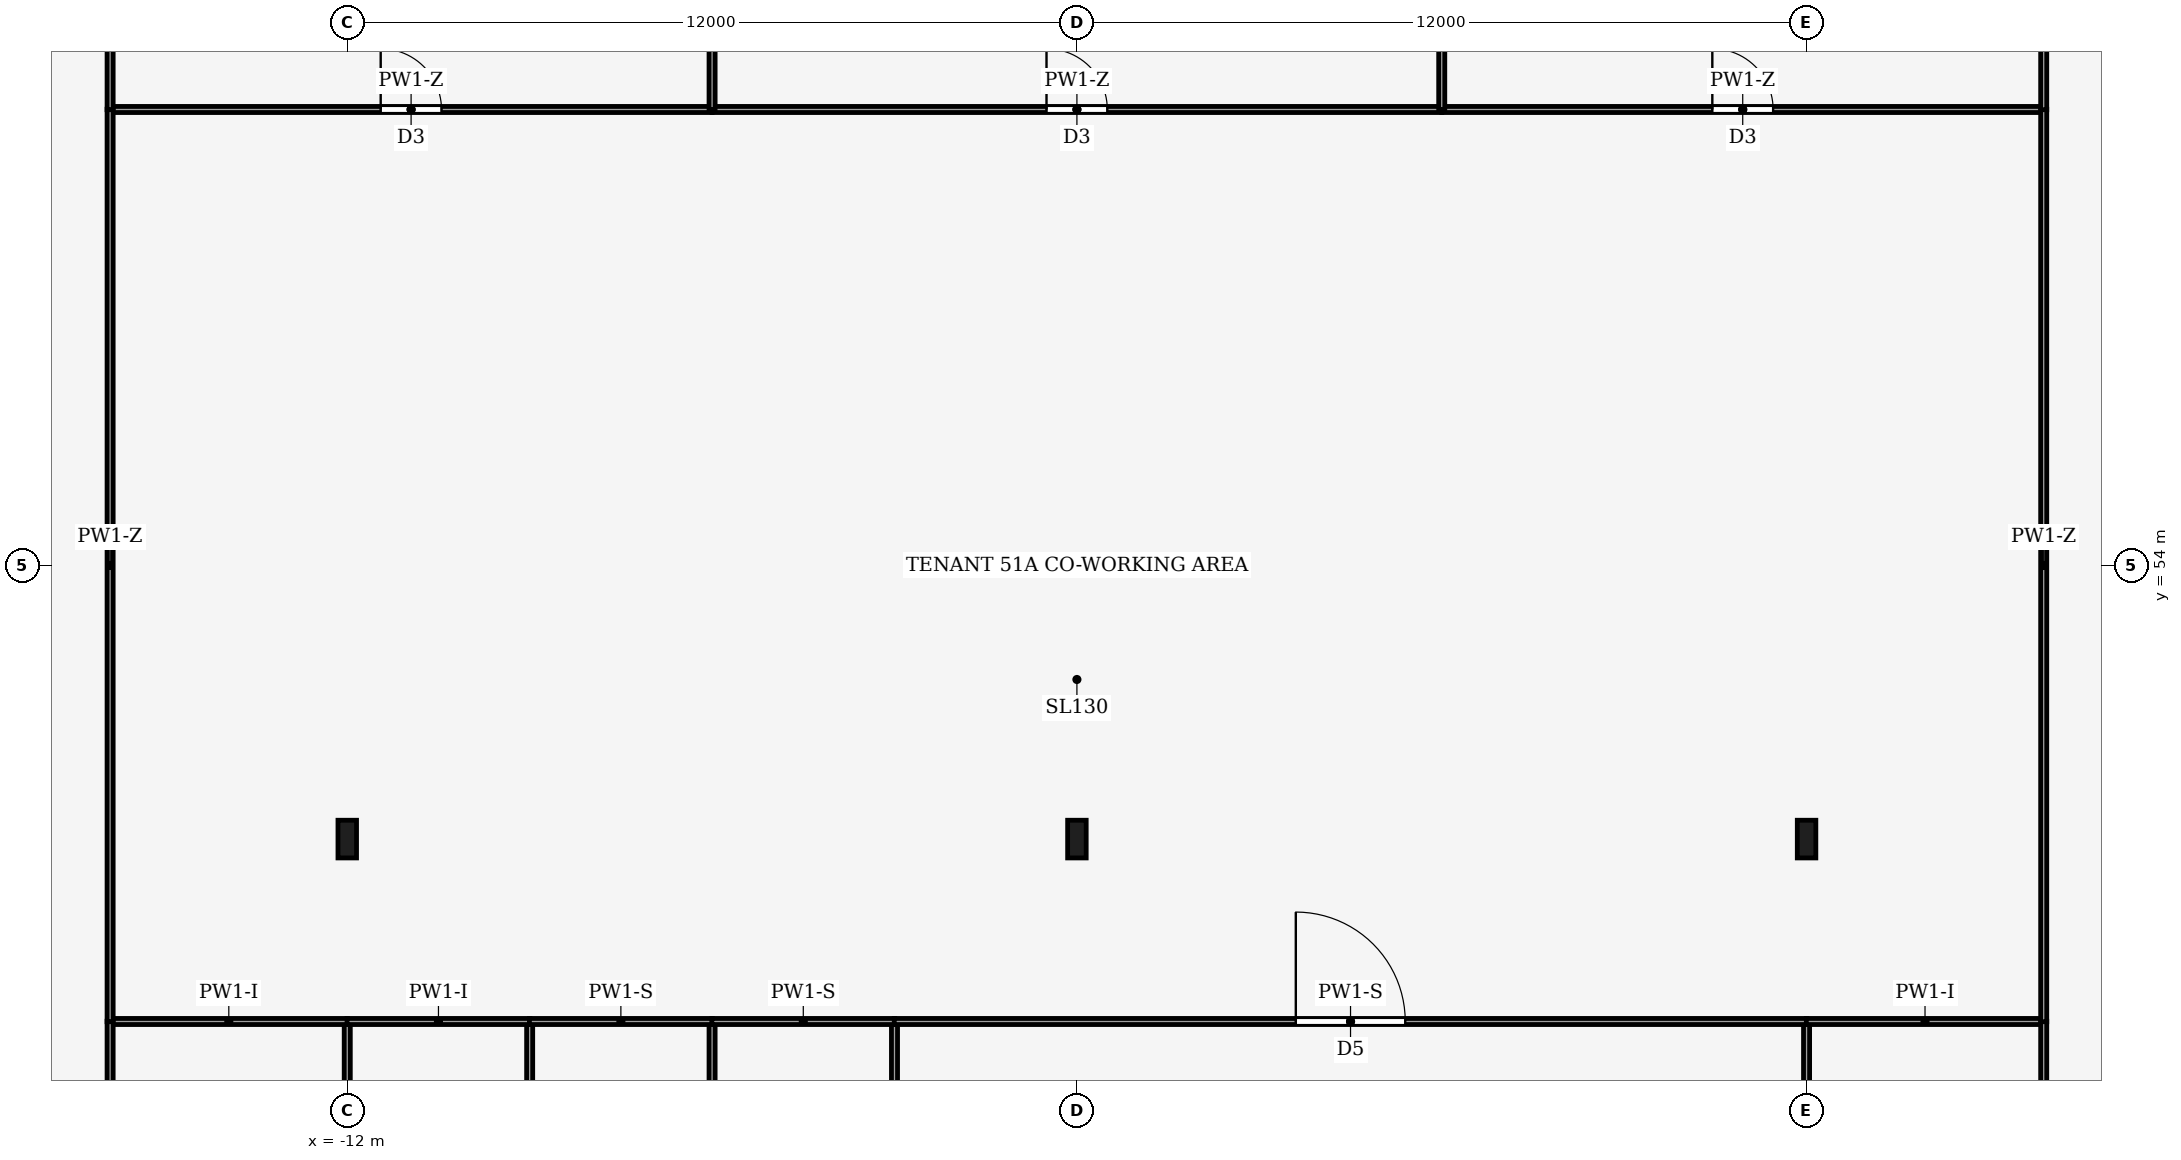
"""IFC4 building model, lengths in metres.
Left out: names, types, materials, properties, quantities, classifications, styles, units other than length and angle.
Written with IfcOpenShell. Run it as: python <this file> out.ifc"""

import sys

from ifc_helpers import new_model, si_unit, direction, frame, frame_2d, origin, origin_2d, place, context, subcontext, project, spatial, rectangle, i_section, extrude, element, fill, save


model = new_model("IFC4")
c1 = context("Model", 3, precision=1e-05, world=origin(), true_north=direction((0.0, 1.0)))
c2 = subcontext(c1, "Body", "Model", "MODEL_VIEW")
j1 = project(units=[si_unit("LENGTHUNIT", "METRE"), si_unit("PLANEANGLEUNIT", "RADIAN")], contexts=[c1])
p1 = place(None, origin())
s1 = spatial("IfcSite", under=j1, at=p1, CompositionType="ELEMENT")
p2 = place(p1, origin())
s2 = spatial("IfcBuilding", under=s1, at=p2, CompositionType="ELEMENT")
p3 = place(p2, frame((0.0, 0.0, 222.0)))
s3 = spatial("IfcBuildingStorey", under=s2, at=p3, CompositionType="ELEMENT", Elevation=222.0)
for number, where, z_axis, x_axis in (
    (1, (-12.0, 49.5, 0.0), (0.0, 0.0, 1.0), (1.0, 0.0, 0.0)),
    (2, (0.0, 49.5, 0.0), (0.0, 0.0, 1.0), (1.0, 0.0, 0.0)),
    (3, (12.0, 49.5, 0.0), (0.0, 0.0, 1.0), (1.0, 0.0, 0.0)),
):
    element("IfcColumn", number, at=place(p3, frame(where, z_axis=z_axis, x_axis=x_axis)), inside=s3, PredefinedType="COLUMN", context=c2, shape_type="SweptSolid", body=[
        extrude(i_section(OverallWidth=0.305, OverallDepth=0.62, WebThickness=0.021, FlangeThickness=0.04, FilletRadius=0.027, at=origin_2d()), origin(), (0.0, 0.0, 1.0), 4.0),
    ])
p4 = place(p3, frame((-12.0, 46.5, 0.0), z_axis=(0.0, 0.0, 1.0), x_axis=(0.0, -1.0, 0.0)))
e4 = element("IfcWall", 4, at=p4, inside=s3, PredefinedType="PARTITIONING", context=c2, shape_type="SweptSolid", body=[
    extrude(rectangle(XDim=5.6, YDim=0.1, at=frame_2d((2.8, 0.0))), origin(), (0.0, 0.0, 1.0), 3.32),
])
p5 = place(p4, frame((2.3, 0.0, 0.0)))
e5 = element("IfcOpeningElement", 5, at=p5, cuts=e4, PredefinedType="OPENING", context=c2, shape_type="SweptSolid", body=[
    extrude(rectangle(XDim=1.0, YDim=2.1, at=frame_2d((0.5, 1.05))), frame((0.0, 0.06, 0.0), z_axis=(0.0, -1.0, 0.0), x_axis=(1.0, 0.0, 0.0)), (0.0, 0.0, 1.0), 0.12),
])
p6 = place(p3, frame((-11.996, 46.5, 0.0), z_axis=(0.0, 0.0, 1.0), x_axis=(-1.0, 0.0, 0.0)))
e6 = element("IfcWall", 6, at=p6, inside=s3, PredefinedType="PARTITIONING", context=c2, shape_type="SweptSolid", body=[
    extrude(rectangle(XDim=3.904, YDim=0.1, at=frame_2d((1.952, 0.0))), origin(), (0.0, 0.0, 1.0), 3.75),
])
p7 = place(p3, frame((-15.9, 46.504, 0.0), z_axis=(0.0, 0.0, 1.0), x_axis=(0.0, -1.0, 0.0)))
e7 = element("IfcWall", 7, at=p7, inside=s3, PredefinedType="PARTITIONING", context=c2, shape_type="SweptSolid", body=[
    extrude(rectangle(XDim=5.608, YDim=0.1, at=frame_2d((2.804, 0.0))), origin(), (0.0, 0.0, 1.0), 3.32),
])
p8 = place(p3, frame((-9.0, 46.5, 0.0), z_axis=(0.0, 0.0, 1.0), x_axis=(0.0, -1.0, 0.0)))
e8 = element("IfcWall", 8, at=p8, inside=s3, PredefinedType="PARTITIONING", context=c2, shape_type="SweptSolid", body=[
    extrude(rectangle(XDim=5.6, YDim=0.1, at=frame_2d((2.8, 0.0))), origin(), (0.0, 0.0, 1.0), 3.75),
])
p9 = place(p8, frame((2.3, 0.0, 0.0)))
e9 = element("IfcOpeningElement", 9, at=p9, cuts=e8, PredefinedType="OPENING", context=c2, shape_type="SweptSolid", body=[
    extrude(rectangle(XDim=1.0, YDim=2.1, at=frame_2d((0.5, 1.05))), frame((0.0, 0.06, 0.0), z_axis=(0.0, -1.0, 0.0), x_axis=(1.0, 0.0, 0.0)), (0.0, 0.0, 1.0), 0.12),
])
p10 = place(p3, frame((-8.996, 46.5, 0.0), z_axis=(0.0, 0.0, 1.0), x_axis=(-1.0, 0.0, 0.0)))
e10 = element("IfcWall", 10, at=p10, inside=s3, PredefinedType="PARTITIONING", context=c2, shape_type="SweptSolid", body=[
    extrude(rectangle(XDim=3.008, YDim=0.1, at=frame_2d((1.504, 0.0))), origin(), (0.0, 0.0, 1.0), 3.75),
])
p11 = place(p3, frame((-6.0, 40.9, 0.0), z_axis=(0.0, 0.0, 1.0), x_axis=(0.0, 1.0, 0.0)))
e11 = element("IfcWall", 11, at=p11, inside=s3, PredefinedType="PARTITIONING", context=c2, shape_type="SweptSolid", body=[
    extrude(rectangle(XDim=5.6, YDim=0.1, at=frame_2d((2.8, 0.0))), origin(), (0.0, 0.0, 1.0), 3.75),
])
p12 = place(p3, frame((-5.996, 46.5, 0.0), z_axis=(0.0, 0.0, 1.0), x_axis=(-1.0, 0.0, 0.0)))
e12 = element("IfcWall", 12, at=p12, inside=s3, PredefinedType="PARTITIONING", context=c2, shape_type="SweptSolid", body=[
    extrude(rectangle(XDim=3.008, YDim=0.1, at=frame_2d((1.504, 0.0))), origin(), (0.0, 0.0, 1.0), 3.32),
])
p13 = place(p3, frame((-3.0, 40.9, 0.0), z_axis=(0.0, 0.0, 1.0), x_axis=(0.0, 1.0, 0.0)))
e13 = element("IfcWall", 13, at=p13, inside=s3, PredefinedType="PARTITIONING", context=c2, shape_type="SweptSolid", body=[
    extrude(rectangle(XDim=5.6, YDim=0.1, at=frame_2d((2.8, 0.0))), origin(), (0.0, 0.0, 1.0), 3.75),
])
p14 = place(p13, frame((2.3, 0.0, 0.0)))
e14 = element("IfcOpeningElement", 14, at=p14, cuts=e13, PredefinedType="OPENING", context=c2, shape_type="SweptSolid", body=[
    extrude(rectangle(XDim=1.0, YDim=2.1, at=frame_2d((0.5, 1.05))), frame((0.0, 0.06, 0.0), z_axis=(0.0, -1.0, 0.0), x_axis=(1.0, 0.0, 0.0)), (0.0, 0.0, 1.0), 0.12),
])
p15 = place(p3, frame((-2.996, 46.5, 0.0), z_axis=(0.0, 0.0, 1.0), x_axis=(-1.0, 0.0, 0.0)))
e15 = element("IfcWall", 15, at=p15, inside=s3, PredefinedType="PARTITIONING", context=c2, shape_type="SweptSolid", body=[
    extrude(rectangle(XDim=3.008, YDim=0.1, at=frame_2d((1.504, 0.0))), origin(), (0.0, 0.0, 1.0), 3.32),
])
p16 = place(p3, frame((12.0, 40.9, 0.0), z_axis=(0.0, 0.0, 1.0), x_axis=(0.0, 1.0, 0.0)))
e16 = element("IfcWall", 16, at=p16, inside=s3, PredefinedType="PARTITIONING", context=c2, shape_type="SweptSolid", body=[
    extrude(rectangle(XDim=5.6, YDim=0.1, at=frame_2d((2.8, 0.0))), origin(), (0.0, 0.0, 1.0), 3.32),
])
p17 = place(p3, frame((-3.004, 46.5, 0.0), z_axis=(0.0, 0.0, 1.0), x_axis=(1.0, 0.0, 0.0)))
e17 = element("IfcWall", 17, at=p17, inside=s3, PredefinedType="PARTITIONING", context=c2, shape_type="SweptSolid", body=[
    extrude(rectangle(XDim=15.008, YDim=0.1, at=frame_2d((7.504, 0.0))), origin(), (0.0, 0.0, 1.0), 3.32),
])
p18 = place(p17, frame((6.604, 0.0, 0.0)))
e18 = element("IfcOpeningElement", 18, at=p18, cuts=e17, PredefinedType="OPENING", context=c2, shape_type="SweptSolid", body=[
    extrude(rectangle(XDim=1.8, YDim=2.1, at=frame_2d((0.9, 1.05))), frame((0.0, 0.06, 0.0), z_axis=(0.0, -1.0, 0.0), x_axis=(1.0, 0.0, 0.0)), (0.0, 0.0, 1.0), 0.12),
])
p19 = place(p3, frame((15.9, 46.5, 0.0), z_axis=(0.0, 0.0, 1.0), x_axis=(-1.0, 0.0, 0.0)))
e19 = element("IfcWall", 19, at=p19, inside=s3, PredefinedType="PARTITIONING", context=c2, shape_type="SweptSolid", body=[
    extrude(rectangle(XDim=3.904, YDim=0.1, at=frame_2d((1.952, 0.0))), origin(), (0.0, 0.0, 1.0), 3.75),
])
p20 = place(p3, frame((15.9, 40.896, 0.0), z_axis=(0.0, 0.0, 1.0), x_axis=(0.0, 1.0, 0.0)))
e20 = element("IfcWall", 20, at=p20, inside=s3, PredefinedType="PARTITIONING", context=c2, shape_type="SweptSolid", body=[
    extrude(rectangle(XDim=5.608, YDim=0.1, at=frame_2d((2.804, 0.0))), origin(), (0.0, 0.0, 1.0), 3.32),
])
p21 = place(p3, frame((-15.9, 61.5, 0.0), z_axis=(0.0, 0.0, 1.0), x_axis=(1.0, 0.0, 0.0)))
e21 = element("IfcWall", 21, at=p21, inside=s3, PredefinedType="PARTITIONING", context=c2, shape_type="SweptSolid", body=[
    extrude(rectangle(XDim=9.9, YDim=0.1, at=frame_2d((4.95, 0.0))), origin(), (0.0, 0.0, 1.0), 3.12),
])
p22 = place(p21, frame((4.45, 0.0, 0.0)))
e22 = element("IfcOpeningElement", 22, at=p22, cuts=e21, PredefinedType="OPENING", context=c2, shape_type="SweptSolid", body=[
    extrude(rectangle(XDim=1.0, YDim=2.1, at=frame_2d((0.5, 1.05))), frame((0.0, 0.06, 0.0), z_axis=(0.0, -1.0, 0.0), x_axis=(1.0, 0.0, 0.0)), (0.0, 0.0, 1.0), 0.12),
])
p23 = place(p3, frame((-6.0, 61.5, 0.0), z_axis=(0.0, 0.0, 1.0), x_axis=(1.0, 0.0, 0.0)))
e23 = element("IfcWall", 23, at=p23, inside=s3, PredefinedType="PARTITIONING", context=c2, shape_type="SweptSolid", body=[
    extrude(rectangle(XDim=12.0, YDim=0.1, at=frame_2d((6.0, 0.0))), origin(), (0.0, 0.0, 1.0), 3.12),
])
p24 = place(p23, frame((5.5, 0.0, 0.0)))
e24 = element("IfcOpeningElement", 24, at=p24, cuts=e23, PredefinedType="OPENING", context=c2, shape_type="SweptSolid", body=[
    extrude(rectangle(XDim=1.0, YDim=2.1, at=frame_2d((0.5, 1.05))), frame((0.0, 0.06, 0.0), z_axis=(0.0, -1.0, 0.0), x_axis=(1.0, 0.0, 0.0)), (0.0, 0.0, 1.0), 0.12),
])
p25 = place(p3, frame((6.0, 61.5, 0.0), z_axis=(0.0, 0.0, 1.0), x_axis=(1.0, 0.0, 0.0)))
e25 = element("IfcWall", 25, at=p25, inside=s3, PredefinedType="PARTITIONING", context=c2, shape_type="SweptSolid", body=[
    extrude(rectangle(XDim=9.9, YDim=0.1, at=frame_2d((4.95, 0.0))), origin(), (0.0, 0.0, 1.0), 3.12),
])
p26 = place(p25, frame((4.45, 0.0, 0.0)))
e26 = element("IfcOpeningElement", 26, at=p26, cuts=e25, PredefinedType="OPENING", context=c2, shape_type="SweptSolid", body=[
    extrude(rectangle(XDim=1.0, YDim=2.1, at=frame_2d((0.5, 1.05))), frame((0.0, 0.06, 0.0), z_axis=(0.0, -1.0, 0.0), x_axis=(1.0, 0.0, 0.0)), (0.0, 0.0, 1.0), 0.12),
])
for number, where, z_axis, x_axis in (
    (27, (-15.9, 61.504, 0.0), (0.0, 0.0, 1.0), (0.0, -1.0, 0.0)),
    (28, (15.9, 46.496, 0.0), (0.0, 0.0, 1.0), (0.0, 1.0, 0.0)),
):
    element("IfcWall", number, at=place(p3, frame(where, z_axis=z_axis, x_axis=x_axis)), inside=s3, PredefinedType="PARTITIONING", context=c2, shape_type="SweptSolid", body=[
        extrude(rectangle(XDim=15.008, YDim=0.1, at=frame_2d((7.504, 0.0))), origin(), (0.0, 0.0, 1.0), 3.12),
    ])
p27 = place(p3, frame((-6.0, 61.5, 0.0), z_axis=(0.0, 0.0, 1.0), x_axis=(0.0, 1.0, 0.0)))
e29 = element("IfcWall", 29, at=p27, inside=s3, PredefinedType="PARTITIONING", context=c2, shape_type="SweptSolid", body=[
    extrude(rectangle(XDim=6.58, YDim=0.1, at=frame_2d((3.29, 0.0))), origin(), (0.0, 0.0, 1.0), 2.92),
])
p28 = place(p3, frame((-15.9, 68.905, 0.0), z_axis=(0.0, 0.0, 1.0), x_axis=(0.0, -1.0, 0.0)))
e30 = element("IfcWall", 30, at=p28, inside=s3, PredefinedType="PARTITIONING", context=c2, shape_type="SweptSolid", body=[
    extrude(rectangle(XDim=7.409, YDim=0.1, at=frame_2d((3.705, 0.0))), origin(), (0.0, 0.0, 1.0), 2.92),
])
p29 = place(p3, frame((6.0, 61.5, 0.0), z_axis=(0.0, 0.0, 1.0), x_axis=(0.0, 1.0, 0.0)))
e31 = element("IfcWall", 31, at=p29, inside=s3, PredefinedType="PARTITIONING", context=c2, shape_type="SweptSolid", body=[
    extrude(rectangle(XDim=6.58, YDim=0.1, at=frame_2d((3.29, 0.0))), origin(), (0.0, 0.0, 1.0), 2.92),
])
p30 = place(p3, frame((15.9, 61.496, 0.0), z_axis=(0.0, 0.0, 1.0), x_axis=(0.0, 1.0, 0.0)))
e32 = element("IfcWall", 32, at=p30, inside=s3, PredefinedType="PARTITIONING", context=c2, shape_type="SweptSolid", body=[
    extrude(rectangle(XDim=7.409, YDim=0.1, at=frame_2d((3.705, 0.0))), origin(), (0.0, 0.0, 1.0), 2.92),
])
p31 = place(p18, origin())
e33 = element("IfcDoor", 33, at=p31, inside=s3, OperationType="DOUBLE_DOOR_SINGLE_SWING", PredefinedType="DOOR", context=c2, shape_type="SweptSolid", body=[
    extrude(rectangle(XDim=1.8, YDim=2.1, at=frame_2d((0.9, 1.05))), frame((0.0, 0.025, 0.0), z_axis=(0.0, -1.0, 0.0), x_axis=(1.0, 0.0, 0.0)), (0.0, 0.0, 1.0), 0.05),
])
fill(e18, e33)
p32 = place(p22, origin())
e34 = element("IfcDoor", 34, at=p32, inside=s3, OperationType="SINGLE_SWING_LEFT", PredefinedType="DOOR", context=c2, shape_type="SweptSolid", body=[
    extrude(rectangle(XDim=1.0, YDim=2.1, at=frame_2d((0.5, 1.05))), frame((0.0, 0.025, 0.0), z_axis=(0.0, -1.0, 0.0), x_axis=(1.0, 0.0, 0.0)), (0.0, 0.0, 1.0), 0.05),
])
fill(e22, e34)
p33 = place(p24, origin())
e35 = element("IfcDoor", 35, at=p33, inside=s3, OperationType="SINGLE_SWING_RIGHT", PredefinedType="DOOR", context=c2, shape_type="SweptSolid", body=[
    extrude(rectangle(XDim=1.0, YDim=2.1, at=frame_2d((0.5, 1.05))), frame((0.0, 0.025, 0.0), z_axis=(0.0, -1.0, 0.0), x_axis=(1.0, 0.0, 0.0)), (0.0, 0.0, 1.0), 0.05),
])
fill(e24, e35)
p34 = place(p26, origin())
e36 = element("IfcDoor", 36, at=p34, inside=s3, OperationType="SINGLE_SWING_LEFT", PredefinedType="DOOR", context=c2, shape_type="SweptSolid", body=[
    extrude(rectangle(XDim=1.0, YDim=2.1, at=frame_2d((0.5, 1.05))), frame((0.0, 0.025, 0.0), z_axis=(0.0, -1.0, 0.0), x_axis=(1.0, 0.0, 0.0)), (0.0, 0.0, 1.0), 0.05),
])
fill(e26, e36)
save(model, sys.argv[1])
